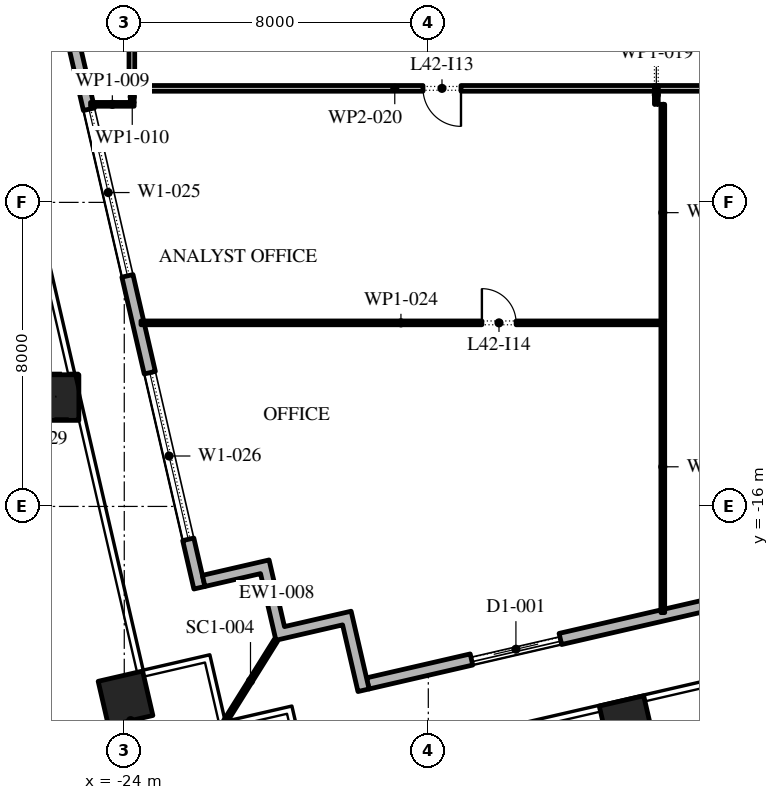
"""IFC4 building model, lengths in metres.
Left out: names, types, materials, properties, quantities, classifications, styles, units other than length and angle.
Written with IfcOpenShell. Run it as: python <this file> out.ifc"""

import sys

from ifc_helpers import new_model, si_unit, direction, frame, frame_2d, origin, origin_2d, place, context, subcontext, project, spatial, polyline, rectangle, outline, extrude, element, fill, save


model = new_model("IFC4")
c1 = context("Model", 3, precision=1e-05, world=origin(), true_north=direction((0.0, 1.0)))
c2 = subcontext(c1, "Body", "Model", "MODEL_VIEW")
j1 = project(units=[si_unit("LENGTHUNIT", "METRE"), si_unit("PLANEANGLEUNIT", "RADIAN")], contexts=[c1])
p1 = place(None, origin())
s1 = spatial("IfcSite", under=j1, at=p1, CompositionType="ELEMENT")
p2 = place(p1, origin())
s2 = spatial("IfcBuilding", under=s1, at=p2, CompositionType="ELEMENT")
p3 = place(p2, frame((0.0, 0.0, 192.6)))
s3 = spatial("IfcBuildingStorey", under=s2, at=p3, CompositionType="ELEMENT", Elevation=192.6)
p4 = place(p3, frame((-10.782, -21.702, 0.0), z_axis=(0.0, 0.0, 1.0), x_axis=(0.974370064785, 0.224951054344, 0.0)))
e1 = element("IfcColumn", 1, at=p4, inside=s3, PredefinedType="COLUMN", context=c2, shape_type="SweptSolid", body=[
    extrude(rectangle(XDim=1.2, YDim=1.2, at=origin_2d()), origin(), (0.0, 0.0, 1.0), 4.2),
])
p5 = place(p3, frame((-25.794, -13.135, 0.0), z_axis=(-0.00267375834, 0.011741286623, 0.999927493974), x_axis=(-0.975037935076, -0.222038341651, 0.0)))
e2 = element("IfcColumn", 2, at=p5, inside=s3, PredefinedType="COLUMN", context=c2, shape_type="SweptSolid", body=[
    extrude(rectangle(XDim=1.2, YDim=1.2, at=origin_2d()), origin(), (0.0, 0.0, 1.0), 4.2),
])
p6 = place(p3, frame((-23.967, -21.051, 0.0), z_axis=(0.0, 0.0, 1.0), x_axis=(0.974370064785, 0.224951054344, 0.0)))
e3 = element("IfcColumn", 3, at=p6, inside=s3, PredefinedType="COLUMN", context=c2, shape_type="SweptSolid", body=[
    extrude(rectangle(XDim=1.2, YDim=1.2, at=origin_2d()), origin(), (0.0, 0.0, 1.0), 4.2),
])
p7 = place(p3, frame((-17.592, -20.657, 0.0), z_axis=(0.0, 0.0, 1.0), x_axis=(0.974370243697, 0.224950279389, 0.0)))
e4 = element("IfcWall", 4, at=p7, inside=s3, PredefinedType="STANDARD", context=c2, shape_type="SweptSolid", body=[
    extrude(rectangle(XDim=49.5, YDim=0.3, at=frame_2d((24.75, 0.0))), origin(), (0.0, 0.0, 1.0), 4.0),
])
p8 = place(p7, frame((2.8, 0.0, 0.0)))
e5 = element("IfcOpeningElement", 5, at=p8, cuts=e4, PredefinedType="OPENING", context=c2, shape_type="SweptSolid", body=[
    extrude(rectangle(XDim=2.4, YDim=3.5, at=frame_2d((1.2, 1.75))), frame((0.0, 0.16, 0.0), z_axis=(0.0, -1.0, 0.0), x_axis=(1.0, 0.0, 0.0)), (0.0, 0.0, 1.0), 0.32),
])
p9 = place(p7, frame((9.9, 0.0, 0.45)))
e6 = element("IfcOpeningElement", 6, at=p9, cuts=e4, PredefinedType="OPENING", context=c2, shape_type="SweptSolid", body=[
    extrude(rectangle(XDim=4.5, YDim=2.575, at=frame_2d((2.25, 1.288))), frame((0.0, 0.16, 0.0), z_axis=(0.0, -1.0, 0.0), x_axis=(1.0, 0.0, 0.0)), (0.0, 0.0, 1.0), 0.32),
])
p10 = place(p7, frame((18.2, 0.0, 0.45)))
e7 = element("IfcOpeningElement", 7, at=p10, cuts=e4, PredefinedType="OPENING", context=c2, shape_type="SweptSolid", body=[
    extrude(rectangle(XDim=4.5, YDim=3.05, at=frame_2d((2.25, 1.525))), frame((0.0, 0.16, 0.0), z_axis=(0.0, -1.0, 0.0), x_axis=(1.0, 0.0, 0.0)), (0.0, 0.0, 1.0), 0.32),
])
p11 = place(p7, frame((26.5, 0.0, 0.45)))
e8 = element("IfcOpeningElement", 8, at=p11, cuts=e4, PredefinedType="OPENING", context=c2, shape_type="SweptSolid", body=[
    extrude(rectangle(XDim=4.5, YDim=2.75, at=frame_2d((2.25, 1.375))), frame((0.0, 0.16, 0.0), z_axis=(0.0, -1.0, 0.0), x_axis=(1.0, 0.0, 0.0)), (0.0, 0.0, 1.0), 0.32),
])
p12 = place(p7, frame((35.85, 0.0, 0.0)))
e9 = element("IfcOpeningElement", 9, at=p12, cuts=e4, PredefinedType="OPENING", context=c2, shape_type="SweptSolid", body=[
    extrude(rectangle(XDim=2.4, YDim=3.5, at=frame_2d((1.2, 1.75))), frame((0.0, 0.16, 0.0), z_axis=(0.0, -1.0, 0.0), x_axis=(1.0, 0.0, 0.0)), (0.0, 0.0, 1.0), 0.32),
])
p13 = place(p7, frame((43.1, 0.0, 0.45)))
e10 = element("IfcOpeningElement", 10, at=p13, cuts=e4, PredefinedType="OPENING", context=c2, shape_type="SweptSolid", body=[
    extrude(rectangle(XDim=4.5, YDim=2.875, at=frame_2d((2.25, 1.438))), frame((0.0, 0.16, 0.0), z_axis=(0.0, -1.0, 0.0), x_axis=(1.0, 0.0, 0.0)), (0.0, 0.0, 1.0), 0.32),
])
p14 = place(p3, frame((-33.157, 30.092, 0.0), z_axis=(0.0, 0.0, 1.0), x_axis=(0.224950279389, -0.974370243697, 0.0)))
e11 = element("IfcWall", 11, at=p14, inside=s3, PredefinedType="STANDARD", context=c2, shape_type="SweptSolid", body=[
    extrude(rectangle(XDim=49.5, YDim=0.3, at=frame_2d((24.75, 0.0))), origin(), (0.0, 0.0, 1.0), 4.0),
])
p15 = place(p14, frame((2.207, 0.0, 0.0)))
e12 = element("IfcOpeningElement", 12, at=p15, cuts=e11, PredefinedType="OPENING", context=c2, shape_type="SweptSolid", body=[
    extrude(rectangle(XDim=2.4, YDim=3.5, at=frame_2d((1.2, 1.75))), frame((0.0, 0.16, 0.0), z_axis=(0.0, -1.0, 0.0), x_axis=(1.0, 0.0, 0.0)), (0.0, 0.0, 1.0), 0.32),
])
p16 = place(p14, frame((8.121, 0.0, 0.45)))
e13 = element("IfcOpeningElement", 13, at=p16, cuts=e11, PredefinedType="OPENING", context=c2, shape_type="SweptSolid", body=[
    extrude(rectangle(XDim=4.5, YDim=2.825, at=frame_2d((2.25, 1.413))), frame((0.0, 0.16, 0.0), z_axis=(0.0, -1.0, 0.0), x_axis=(1.0, 0.0, 0.0)), (0.0, 0.0, 1.0), 0.32),
])
p17 = place(p14, frame((15.236, 0.0, 0.45)))
e14 = element("IfcOpeningElement", 14, at=p17, cuts=e11, PredefinedType="OPENING", context=c2, shape_type="SweptSolid", body=[
    extrude(rectangle(XDim=4.5, YDim=2.95, at=frame_2d((2.25, 1.475))), frame((0.0, 0.16, 0.0), z_axis=(0.0, -1.0, 0.0), x_axis=(1.0, 0.0, 0.0)), (0.0, 0.0, 1.0), 0.32),
])
p18 = place(p14, frame((22.35, 0.0, 0.45)))
e15 = element("IfcOpeningElement", 15, at=p18, cuts=e11, PredefinedType="OPENING", context=c2, shape_type="SweptSolid", body=[
    extrude(rectangle(XDim=4.5, YDim=3.0, at=frame_2d((2.25, 1.5))), frame((0.0, 0.16, 0.0), z_axis=(0.0, -1.0, 0.0), x_axis=(1.0, 0.0, 0.0)), (0.0, 0.0, 1.0), 0.32),
])
p19 = place(p14, frame((30.514, 0.0, 0.0)))
e16 = element("IfcOpeningElement", 16, at=p19, cuts=e11, PredefinedType="OPENING", context=c2, shape_type="SweptSolid", body=[
    extrude(rectangle(XDim=2.4, YDim=3.5, at=frame_2d((1.2, 1.75))), frame((0.0, 0.16, 0.0), z_axis=(0.0, -1.0, 0.0), x_axis=(1.0, 0.0, 0.0)), (0.0, 0.0, 1.0), 0.32),
])
p20 = place(p14, frame((36.579, 0.0, 0.45)))
e17 = element("IfcOpeningElement", 17, at=p20, cuts=e11, PredefinedType="OPENING", context=c2, shape_type="SweptSolid", body=[
    extrude(rectangle(XDim=4.5, YDim=3.05, at=frame_2d((2.25, 1.525))), frame((0.0, 0.16, 0.0), z_axis=(0.0, -1.0, 0.0), x_axis=(1.0, 0.0, 0.0)), (0.0, 0.0, 1.0), 0.32),
])
p21 = place(p14, frame((43.693, 0.0, 0.45)))
e18 = element("IfcOpeningElement", 18, at=p21, cuts=e11, PredefinedType="OPENING", context=c2, shape_type="SweptSolid", body=[
    extrude(rectangle(XDim=4.5, YDim=3.05, at=frame_2d((2.25, 1.525))), frame((0.0, 0.16, 0.0), z_axis=(0.0, -1.0, 0.0), x_axis=(1.0, 0.0, 0.0)), (0.0, 0.0, 1.0), 0.32),
])
p22 = place(p3, origin())
e19 = element("IfcWall", 19, at=p22, inside=s3, PredefinedType="STANDARD", context=c2, shape_type="SweptSolid", body=[
    extrude(outline(polyline([(-18.256, -19.117), (-20.01, -19.522), (-20.414, -17.768), (-21.876, -18.105), (-21.943, -17.813), (-20.19, -17.408), (-19.785, -19.162), (-18.031, -18.757), (-17.558, -20.803), (-17.851, -20.871), (-18.256, -19.117)])), origin(), (0.0, 0.0, 1.0), 4.0),
])
p23 = place(p3, frame((-20.01, -19.522, -0.05), z_axis=(0.0, 0.0, 1.0), x_axis=(-0.529920736377, -0.848047176257, 0.0)))
e20 = element("IfcWall", 20, at=p23, inside=s3, PredefinedType="STANDARD", context=c2, shape_type="SweptSolid", body=[
    extrude(rectangle(XDim=2.526, YDim=0.1, at=frame_2d((1.263, 0.0))), origin(), (0.0, 0.0, 1.0), 4.05),
])
p24 = place(p3, frame((-23.8, -5.075, 0.0), z_axis=(0.0, 0.0, 1.0), x_axis=(0.0, 1.0, 0.0)))
e21 = element("IfcWall", 21, at=p24, inside=s3, PredefinedType="PARTITIONING", context=c2, shape_type="SweptSolid", body=[
    extrude(rectangle(XDim=14.745, YDim=0.15, at=frame_2d((7.373, 0.0))), origin(), (0.0, 0.0, 1.0), 4.0),
])
p25 = place(p24, frame((5.545, 0.0, 0.0)))
e22 = element("IfcOpeningElement", 22, at=p25, cuts=e21, PredefinedType="OPENING", context=c2, shape_type="SweptSolid", body=[
    extrude(rectangle(XDim=1.0, YDim=2.1, at=frame_2d((0.5, 1.05))), frame((0.0, 0.085, 0.0), z_axis=(0.0, -1.0, 0.0), x_axis=(1.0, 0.0, 0.0)), (0.0, 0.0, 1.0), 0.17),
])
p26 = place(p3, frame((-23.74, -5.42, 0.0), z_axis=(0.0, 0.0, 1.0), x_axis=(-1.0, 0.0, 0.0)))
e23 = element("IfcWall", 23, at=p26, inside=s3, PredefinedType="PARTITIONING", context=c2, shape_type="SweptSolid", body=[
    extrude(rectangle(XDim=1.147, YDim=0.1, at=frame_2d((0.573, 0.0))), origin(), (0.0, 0.0, 1.0), 4.0),
])
p27 = place(p3, frame((-23.79, -5.075, 0.0), z_axis=(0.0, 0.0, 1.0), x_axis=(0.0, -1.0, 0.0)))
e24 = element("IfcWall", 24, at=p27, inside=s3, PredefinedType="PARTITIONING", context=c2, shape_type="SweptSolid", body=[
    extrude(rectangle(XDim=0.295, YDim=0.1, at=frame_2d((0.147, 0.0))), origin(), (0.0, 0.0, 1.0), 4.0),
])
p28 = place(p3, frame((-10.0, -5.42, 0.0), z_axis=(0.0, 0.0, 1.0), x_axis=(0.0, 1.0, 0.0)))
e25 = element("IfcWall", 25, at=p28, inside=s3, PredefinedType="PARTITIONING", context=c2, shape_type="SweptSolid", body=[
    extrude(rectangle(XDim=0.495, YDim=0.1, at=frame_2d((0.248, 0.0))), origin(), (0.0, 0.0, 1.0), 4.0),
])
p29 = place(p3, frame((-10.05, -5.0, 0.0), z_axis=(0.0, 0.0, 1.0), x_axis=(-1.0, 0.0, 0.0)))
e26 = element("IfcWall", 26, at=p29, inside=s3, PredefinedType="PARTITIONING", context=c2, shape_type="SweptSolid", body=[
    extrude(rectangle(XDim=13.665, YDim=0.15, at=frame_2d((6.833, 0.0))), origin(), (0.0, 0.0, 1.0), 4.0),
])
p30 = place(p29, frame((5.09, 0.0, 0.0)))
e27 = element("IfcOpeningElement", 27, at=p30, cuts=e26, PredefinedType="OPENING", context=c2, shape_type="SweptSolid", body=[
    extrude(rectangle(XDim=1.0, YDim=2.1, at=frame_2d((0.5, 1.05))), frame((0.0, 0.085, 0.0), z_axis=(0.0, -1.0, 0.0), x_axis=(1.0, 0.0, 0.0)), (0.0, 0.0, 1.0), 0.17),
])
p31 = place(p3, frame((-9.83, -18.794, 0.0), z_axis=(0.0, 0.0, 1.0), x_axis=(0.0, 1.0, 0.0)))
e28 = element("IfcWall", 28, at=p31, inside=s3, PredefinedType="PARTITIONING", context=c2, shape_type="SweptSolid", body=[
    extrude(rectangle(XDim=7.674, YDim=0.1, at=frame_2d((3.837, 0.0))), origin(), (0.0, 0.0, 1.0), 4.0),
])
p32 = place(p3, frame((-9.88, -11.17, 0.0), z_axis=(0.0, 0.0, 1.0), x_axis=(-1.0, 0.0, 0.0)))
e29 = element("IfcWall", 29, at=p32, inside=s3, PredefinedType="PARTITIONING", context=c2, shape_type="SweptSolid", body=[
    extrude(rectangle(XDim=13.68, YDim=0.1, at=frame_2d((6.84, 0.0))), origin(), (0.0, 0.0, 1.0), 4.0),
])
p33 = place(p32, frame((3.81, 0.0, 0.0)))
e30 = element("IfcOpeningElement", 30, at=p33, cuts=e29, PredefinedType="OPENING", context=c2, shape_type="SweptSolid", body=[
    extrude(rectangle(XDim=0.9, YDim=2.1, at=frame_2d((0.45, 1.05))), frame((0.0, 0.06, 0.0), z_axis=(0.0, -1.0, 0.0), x_axis=(1.0, 0.0, 0.0)), (0.0, 0.0, 1.0), 0.12),
])
p34 = place(p3, frame((-9.83, -11.12, 0.0), z_axis=(0.0, 0.0, 1.0), x_axis=(0.0, 1.0, 0.0)))
e31 = element("IfcWall", 31, at=p34, inside=s3, PredefinedType="PARTITIONING", context=c2, shape_type="SweptSolid", body=[
    extrude(rectangle(XDim=5.7, YDim=0.1, at=frame_2d((2.85, 0.0))), origin(), (0.0, 0.0, 1.0), 4.0),
])
p35 = place(p3, frame((-1.065, -5.0, 0.0), z_axis=(0.0, 0.0, 1.0), x_axis=(-1.0, 0.0, 0.0)))
e32 = element("IfcWall", 32, at=p35, inside=s3, PredefinedType="PARTITIONING", context=c2, shape_type="SweptSolid", body=[
    extrude(rectangle(XDim=8.885, YDim=0.15, at=frame_2d((4.442, 0.0))), origin(), (0.0, 0.0, 1.0), 4.0),
])
p36 = place(p8, origin())
e33 = element("IfcDoor", 33, at=p36, inside=s3, OperationType="DOUBLE_DOOR_SLIDING", PredefinedType="DOOR", context=c2, shape_type="SweptSolid", body=[
    extrude(rectangle(XDim=2.4, YDim=3.5, at=frame_2d((1.2, 1.75))), frame((0.0, 0.025, 0.0), z_axis=(0.0, -1.0, 0.0), x_axis=(1.0, 0.0, 0.0)), (0.0, 0.0, 1.0), 0.05),
])
fill(e5, e33)
p37 = place(p20, origin())
e34 = element("IfcWindow", 34, at=p37, inside=s3, PartitioningType="DOUBLE_PANEL_VERTICAL", PredefinedType="WINDOW", context=c2, shape_type="SweptSolid", body=[
    extrude(rectangle(XDim=4.5, YDim=3.05, at=frame_2d((2.25, 1.525))), frame((0.0, 0.03, 0.0), z_axis=(0.0, -1.0, 0.0), x_axis=(1.0, 0.0, 0.0)), (0.0, 0.0, 1.0), 0.06),
])
fill(e17, e34)
p38 = place(p21, origin())
e35 = element("IfcWindow", 35, at=p38, inside=s3, PartitioningType="DOUBLE_PANEL_VERTICAL", PredefinedType="WINDOW", context=c2, shape_type="SweptSolid", body=[
    extrude(rectangle(XDim=4.5, YDim=3.05, at=frame_2d((2.25, 1.525))), frame((0.0, 0.03, 0.0), z_axis=(0.0, -1.0, 0.0), x_axis=(1.0, 0.0, 0.0)), (0.0, 0.0, 1.0), 0.06),
])
fill(e18, e35)
p39 = place(p30, origin())
e36 = element("IfcDoor", 36, at=p39, inside=s3, OperationType="SINGLE_SWING_RIGHT", PredefinedType="DOOR", context=c2, shape_type="SweptSolid", body=[
    extrude(rectangle(XDim=1.0, YDim=2.1, at=frame_2d((0.5, 1.05))), frame((0.0, 0.025, 0.0), z_axis=(0.0, -1.0, 0.0), x_axis=(1.0, 0.0, 0.0)), (0.0, 0.0, 1.0), 0.05),
])
fill(e27, e36)
p40 = place(p33, frame((0.9, 0.0, 0.0), z_axis=(0.0, 0.0, 1.0), x_axis=(-1.0, 0.0, 0.0)))
e37 = element("IfcDoor", 37, at=p40, inside=s3, OperationType="SINGLE_SWING_RIGHT", PredefinedType="DOOR", context=c2, shape_type="SweptSolid", body=[
    extrude(rectangle(XDim=0.9, YDim=2.1, at=frame_2d((0.45, 1.05))), frame((0.0, 0.025, 0.0), z_axis=(0.0, -1.0, 0.0), x_axis=(1.0, 0.0, 0.0)), (0.0, 0.0, 1.0), 0.05),
])
fill(e30, e37)
save(model, sys.argv[1])
